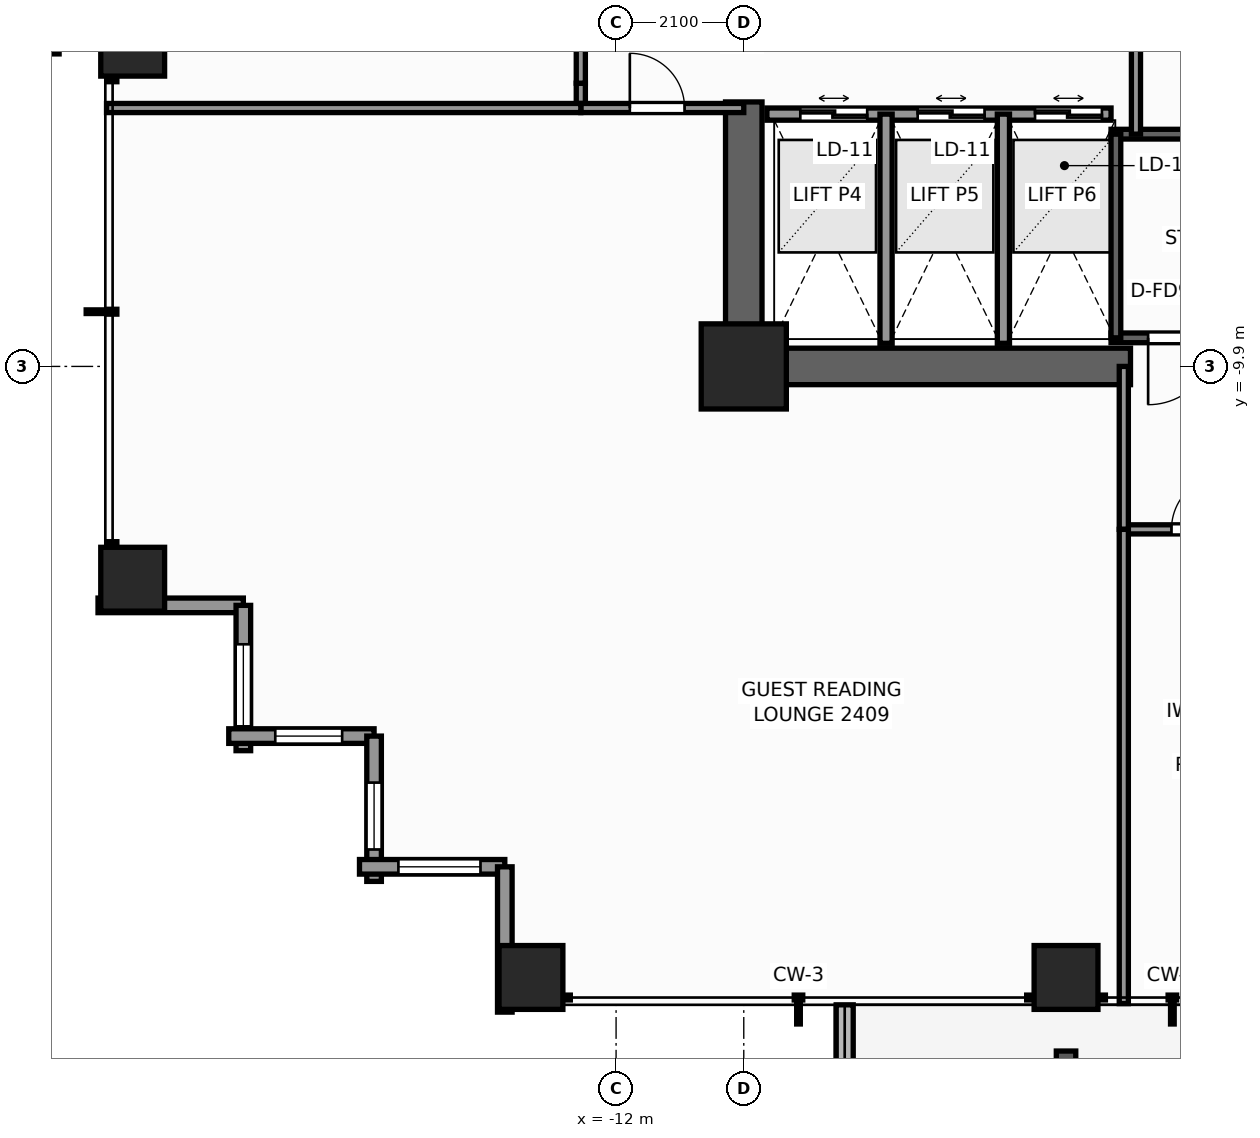
"""IFC4 building model, lengths in metres.
Left out: names, types, materials, properties, quantities, classifications, styles, units other than length and angle.
Written with IfcOpenShell. Run it as: python <this file> out.ifc"""

import sys

from ifc_helpers import new_model, si_unit, direction, frame, frame_2d, origin, origin_2d, place, context, subcontext, project, spatial, rectangle, extrude, element, fill, save


model = new_model("IFC4")
c1 = context("Model", 3, precision=1e-05, world=origin(), true_north=direction((0.0, 1.0)))
c2 = subcontext(c1, "Body", "Model", "MODEL_VIEW")
j1 = project(units=[si_unit("LENGTHUNIT", "METRE"), si_unit("PLANEANGLEUNIT", "RADIAN")], contexts=[c1])
p1 = place(None, origin())
s1 = spatial("IfcSite", under=j1, at=p1, CompositionType="ELEMENT")
p2 = place(p1, origin())
s2 = spatial("IfcBuilding", under=s1, at=p2, CompositionType="ELEMENT")
p3 = place(p2, frame((0.0, 0.0, 85.4)))
s3 = spatial("IfcBuildingStorey", under=s2, at=p3, CompositionType="ELEMENT", Elevation=85.4)
p4 = place(p3, frame((-3.54, -9.9, 0.0), z_axis=(0.0, 0.0, 1.0), x_axis=(-1.0, 0.0, 0.0)))
e1 = element("IfcWall", 1, at=p4, inside=s3, PredefinedType="SHEAR", context=c2, shape_type="SweptSolid", body=[
    extrude(rectangle(XDim=6.66, YDim=0.6, at=frame_2d((3.33, 0.0))), origin(), (0.0, 0.0, 1.0), 3.3),
])
p5 = place(p3, frame((-9.9, -9.6, 0.0), z_axis=(0.0, 0.0, 1.0), x_axis=(0.0, 1.0, 0.0)))
e2 = element("IfcWall", 2, at=p5, inside=s3, PredefinedType="SHEAR", context=c2, shape_type="SweptSolid", body=[
    extrude(rectangle(XDim=4.05, YDim=0.6, at=frame_2d((2.025, 0.0))), origin(), (0.0, 0.0, 1.0), 3.3),
])
p6 = place(p3, frame((-9.9, -9.9, 0.0), z_axis=(0.0, 0.0, 1.0), x_axis=(1.0, 0.0, 0.0)))
e3 = element("IfcColumn", 3, at=p6, inside=s3, PredefinedType="COLUMN", context=c2, shape_type="SweptSolid", body=[
    extrude(rectangle(XDim=1.4, YDim=1.4, at=origin_2d()), origin(), (0.0, 0.0, 1.0), 3.3),
])
for number, where, z_axis, x_axis in (
    (4, (-13.4, -19.95, 0.0), (0.0, 0.0, 1.0), (1.0, 0.0, 0.0)),
    (5, (-4.6, -19.95, 0.0), (0.0, 0.0, 1.0), (1.0, 0.0, 0.0)),
    (6, (-19.95, -13.4, 0.0), (0.0, 0.0, 1.0), (1.0, 0.0, 0.0)),
    (7, (-19.95, -4.6, 0.0), (0.0, 0.0, 1.0), (1.0, 0.0, 0.0)),
):
    element("IfcColumn", number, at=place(p3, frame(where, z_axis=z_axis, x_axis=x_axis)), inside=s3, PredefinedType="COLUMN", context=c2, shape_type="SweptSolid", body=[
        extrude(rectangle(XDim=1.05, YDim=1.05, at=origin_2d()), origin(), (0.0, 0.0, 1.0), 3.3),
    ])
p7 = place(p3, frame((-8.24, -20.4, -0.04), z_axis=(0.0, 0.0, 1.0), x_axis=(0.0, -1.0, 0.0)))
e8 = element("IfcWall", 8, at=p7, inside=s3, PredefinedType="PARAPET", context=c2, shape_type="SweptSolid", body=[
    extrude(rectangle(XDim=2.674, YDim=0.28, at=frame_2d((1.337, 0.0))), origin(), (0.0, 0.0, 1.0), 0.42),
])
p8 = place(p3, frame((-18.13, -13.83, 0.0), z_axis=(0.0, 0.0, 1.0), x_axis=(-1.0, 0.0, 0.0)))
e9 = element("IfcWall", 9, at=p8, inside=s3, PredefinedType="STANDARD", context=c2, shape_type="SweptSolid", body=[
    extrude(rectangle(XDim=2.39, YDim=0.24, at=frame_2d((1.195, 0.0))), origin(), (0.0, 0.0, 1.0), 1.275),
])
p9 = place(p3, frame((-18.13, -16.22, 0.0), z_axis=(0.0, 0.0, 1.0), x_axis=(0.0, 1.0, 0.0)))
e10 = element("IfcWall", 10, at=p9, inside=s3, PredefinedType="STANDARD", context=c2, shape_type="SweptSolid", body=[
    extrude(rectangle(XDim=2.39, YDim=0.24, at=frame_2d((1.195, 0.0))), origin(), (0.0, 0.0, 1.0), 2.459),
])
p10 = place(p9, frame((0.4, 0.0, 0.65)))
e11 = element("IfcOpeningElement", 11, at=p10, cuts=e10, PredefinedType="OPENING", context=c2, shape_type="SweptSolid", body=[
    extrude(rectangle(XDim=1.35, YDim=1.55, at=frame_2d((0.675, 0.775))), frame((0.0, 0.13, 0.0), z_axis=(0.0, -1.0, 0.0), x_axis=(1.0, 0.0, 0.0)), (0.0, 0.0, 1.0), 0.26),
])
p11 = place(p3, frame((-15.98, -15.98, 0.0), z_axis=(0.0, 0.0, 1.0), x_axis=(-1.0, 0.0, 0.0)))
e12 = element("IfcWall", 12, at=p11, inside=s3, PredefinedType="STANDARD", context=c2, shape_type="SweptSolid", body=[
    extrude(rectangle(XDim=2.39, YDim=0.24, at=frame_2d((1.195, 0.0))), origin(), (0.0, 0.0, 1.0), 2.459),
])
p12 = place(p11, frame((0.525, 0.0, 0.65)))
e13 = element("IfcOpeningElement", 13, at=p12, cuts=e12, PredefinedType="OPENING", context=c2, shape_type="SweptSolid", body=[
    extrude(rectangle(XDim=1.1, YDim=1.45, at=frame_2d((0.55, 0.725))), frame((0.0, 0.13, 0.0), z_axis=(0.0, -1.0, 0.0), x_axis=(1.0, 0.0, 0.0)), (0.0, 0.0, 1.0), 0.26),
])
p13 = place(p3, frame((-15.98, -18.37, 0.0), z_axis=(0.0, 0.0, 1.0), x_axis=(0.0, 1.0, 0.0)))
e14 = element("IfcWall", 14, at=p13, inside=s3, PredefinedType="STANDARD", context=c2, shape_type="SweptSolid", body=[
    extrude(rectangle(XDim=2.39, YDim=0.24, at=frame_2d((1.195, 0.0))), origin(), (0.0, 0.0, 1.0), 2.459),
])
p14 = place(p13, frame((0.525, 0.0, 0.65)))
e15 = element("IfcOpeningElement", 15, at=p14, cuts=e14, PredefinedType="OPENING", context=c2, shape_type="SweptSolid", body=[
    extrude(rectangle(XDim=1.1, YDim=1.45, at=frame_2d((0.55, 0.725))), frame((0.0, 0.13, 0.0), z_axis=(0.0, -1.0, 0.0), x_axis=(1.0, 0.0, 0.0)), (0.0, 0.0, 1.0), 0.26),
])
p15 = place(p3, frame((-13.83, -18.13, 0.0), z_axis=(0.0, 0.0, 1.0), x_axis=(-1.0, 0.0, 0.0)))
e16 = element("IfcWall", 16, at=p15, inside=s3, PredefinedType="STANDARD", context=c2, shape_type="SweptSolid", body=[
    extrude(rectangle(XDim=2.39, YDim=0.24, at=frame_2d((1.195, 0.0))), origin(), (0.0, 0.0, 1.0), 2.459),
])
p16 = place(p15, frame((0.4, 0.0, 0.65)))
e17 = element("IfcOpeningElement", 17, at=p16, cuts=e16, PredefinedType="OPENING", context=c2, shape_type="SweptSolid", body=[
    extrude(rectangle(XDim=1.35, YDim=1.55, at=frame_2d((0.675, 0.775))), frame((0.0, 0.13, 0.0), z_axis=(0.0, -1.0, 0.0), x_axis=(1.0, 0.0, 0.0)), (0.0, 0.0, 1.0), 0.26),
])
p17 = place(p3, frame((-13.83, -20.52, 0.0), z_axis=(0.0, 0.0, 1.0), x_axis=(0.0, 1.0, 0.0)))
e18 = element("IfcWall", 18, at=p17, inside=s3, PredefinedType="STANDARD", context=c2, shape_type="SweptSolid", body=[
    extrude(rectangle(XDim=2.39, YDim=0.24, at=frame_2d((1.195, 0.0))), origin(), (0.0, 0.0, 1.0), 1.275),
])
p18 = place(p3, frame((3.86, -9.43, 0.0), z_axis=(0.0, 0.0, 1.0), x_axis=(-1.0, 0.0, 0.0)))
e19 = element("IfcWall", 19, at=p18, inside=s3, PredefinedType="SHEAR", context=c2, shape_type="SweptSolid", body=[
    extrude(rectangle(XDim=7.72, YDim=0.16, at=frame_2d((3.86, 0.0))), origin(), (0.0, 0.0, 1.0), 3.3),
])
p19 = place(p18, frame((6.01, 0.0, 0.0)))
e20 = element("IfcOpeningElement", 20, at=p19, cuts=e19, PredefinedType="OPENING", context=c2, shape_type="SweptSolid", body=[
    extrude(rectangle(XDim=1.1, YDim=2.2, at=frame_2d((0.55, 1.1))), frame((0.0, 0.09, 0.0), z_axis=(0.0, -1.0, 0.0), x_axis=(1.0, 0.0, 0.0)), (0.0, 0.0, 1.0), 0.18),
])
p20 = place(p3, frame((-3.86, -6.08, 0.0), z_axis=(0.0, 0.0, 1.0), x_axis=(1.0, 0.0, 0.0)))
e21 = element("IfcWall", 21, at=p20, inside=s3, PredefinedType="SHEAR", context=c2, shape_type="SweptSolid", body=[
    extrude(rectangle(XDim=7.72, YDim=0.16, at=frame_2d((3.86, 0.0))), origin(), (0.0, 0.0, 1.0), 3.3),
])
p21 = place(p3, frame((-3.78, -9.43, 0.0), z_axis=(0.0, 0.0, 1.0), x_axis=(0.0, 1.0, 0.0)))
e22 = element("IfcWall", 22, at=p21, inside=s3, PredefinedType="SHEAR", context=c2, shape_type="SweptSolid", body=[
    extrude(rectangle(XDim=3.35, YDim=0.16, at=frame_2d((1.675, 0.0))), origin(), (0.0, 0.0, 1.0), 3.3),
])
p22 = place(p3, frame((-9.52, -5.75, 0.0), z_axis=(0.0, 0.0, 1.0), x_axis=(1.0, 0.0, 0.0)))
e23 = element("IfcWall", 23, at=p22, inside=s3, PredefinedType="SOLIDWALL", context=c2, shape_type="SweptSolid", body=[
    extrude(rectangle(XDim=5.66, YDim=0.2, at=frame_2d((2.83, 0.0))), origin(), (0.0, 0.0, 1.0), 3.08),
])
p23 = place(p22, frame((0.55, 0.0, 0.0)))
e24 = element("IfcOpeningElement", 24, at=p23, cuts=e23, PredefinedType="OPENING", context=c2, shape_type="SweptSolid", body=[
    extrude(rectangle(XDim=1.1, YDim=2.2, at=frame_2d((0.55, 1.1))), frame((0.0, 0.11, 0.0), z_axis=(0.0, -1.0, 0.0), x_axis=(1.0, 0.0, 0.0)), (0.0, 0.0, 1.0), 0.22),
])
p24 = place(p22, frame((2.48, 0.0, 0.0)))
e25 = element("IfcOpeningElement", 25, at=p24, cuts=e23, PredefinedType="OPENING", context=c2, shape_type="SweptSolid", body=[
    extrude(rectangle(XDim=1.1, YDim=2.2, at=frame_2d((0.55, 1.1))), frame((0.0, 0.11, 0.0), z_axis=(0.0, -1.0, 0.0), x_axis=(1.0, 0.0, 0.0)), (0.0, 0.0, 1.0), 0.22),
])
p25 = place(p22, frame((4.41, 0.0, 0.0)))
e26 = element("IfcOpeningElement", 26, at=p25, cuts=e23, PredefinedType="OPENING", context=c2, shape_type="SweptSolid", body=[
    extrude(rectangle(XDim=1.1, YDim=2.2, at=frame_2d((0.55, 1.1))), frame((0.0, 0.11, 0.0), z_axis=(0.0, -1.0, 0.0), x_axis=(1.0, 0.0, 0.0)), (0.0, 0.0, 1.0), 0.22),
])
for number, where, z_axis, x_axis in (
    (27, (-7.56, -9.52, 0.0), (0.0, 0.0, 1.0), (0.0, 1.0, 0.0)),
    (28, (-5.63, -9.52, 0.0), (0.0, 0.0, 1.0), (0.0, 1.0, 0.0)),
):
    element("IfcWall", number, at=place(p3, frame(where, z_axis=z_axis, x_axis=x_axis)), inside=s3, PredefinedType="SOLIDWALL", context=c2, shape_type="SweptSolid", body=[
        extrude(rectangle(XDim=3.77, YDim=0.2, at=frame_2d((1.885, 0.0))), origin(), (0.0, 0.0, 1.0), 3.08),
    ])
p26 = place(p3, frame((-3.45, -6.08, 0.0), z_axis=(0.0, 0.0, 1.0), x_axis=(0.0, 1.0, 0.0)))
e29 = element("IfcWall", 29, at=p26, inside=s3, PredefinedType="PARTITIONING", context=c2, shape_type="SweptSolid", body=[
    extrude(rectangle(XDim=2.36, YDim=0.15, at=frame_2d((1.18, 0.0))), origin(), (0.0, 0.0, 1.0), 3.08),
])
p27 = place(p3, frame((-3.65, -12.58, 0.0), z_axis=(0.0, 0.0, 1.0), x_axis=(1.0, 0.0, 0.0)))
e30 = element("IfcWall", 30, at=p27, inside=s3, PredefinedType="PARTITIONING", context=c2, shape_type="SweptSolid", body=[
    extrude(rectangle(XDim=7.608, YDim=0.15, at=frame_2d((3.804, 0.0))), origin(), (0.0, 0.0, 1.0), 2.605),
])
p28 = place(p27, frame((0.784, 0.0, 0.0)))
e31 = element("IfcOpeningElement", 31, at=p28, cuts=e30, PredefinedType="OPENING", context=c2, shape_type="SweptSolid", body=[
    extrude(rectangle(XDim=0.9, YDim=2.06, at=frame_2d((0.45, 1.03))), frame((0.0, 0.085, 0.0), z_axis=(0.0, -1.0, 0.0), x_axis=(1.0, 0.0, 0.0)), (0.0, 0.0, 1.0), 0.17),
])
p29 = place(p27, frame((4.418, 0.0, 0.0)))
e32 = element("IfcOpeningElement", 32, at=p29, cuts=e30, PredefinedType="OPENING", context=c2, shape_type="SweptSolid", body=[
    extrude(rectangle(XDim=0.95, YDim=2.06, at=frame_2d((0.475, 1.03))), frame((0.0, 0.085, 0.0), z_axis=(0.0, -1.0, 0.0), x_axis=(1.0, 0.0, 0.0)), (0.0, 0.0, 1.0), 0.17),
])
p30 = place(p3, frame((-3.65, -12.58, 0.0), z_axis=(0.0, 0.0, 1.0), x_axis=(0.0, 1.0, 0.0)))
e33 = element("IfcWall", 33, at=p30, inside=s3, PredefinedType="PARTITIONING", context=c2, shape_type="SweptSolid", body=[
    extrude(rectangle(XDim=2.68, YDim=0.15, at=frame_2d((1.34, 0.0))), origin(), (0.0, 0.0, 1.0), 3.08),
])
p31 = place(p3, frame((-12.58, -5.65, 0.0), z_axis=(0.0, 0.0, 1.0), x_axis=(0.0, 1.0, 0.0)))
e34 = element("IfcWall", 34, at=p31, inside=s3, PredefinedType="PARTITIONING", context=c2, shape_type="SweptSolid", body=[
    extrude(rectangle(XDim=0.408, YDim=0.15, at=frame_2d((0.204, 0.0))), origin(), (0.0, 0.0, 1.0), 3.08),
])
p32 = place(p3, frame((-12.58, -5.242, 0.0), z_axis=(0.0, 0.0, 1.0), x_axis=(0.0, 1.0, 0.0)))
e35 = element("IfcWall", 35, at=p32, inside=s3, PredefinedType="PARTITIONING", context=c2, shape_type="SweptSolid", body=[
    extrude(rectangle(XDim=1.284, YDim=0.15, at=frame_2d((0.642, 0.0))), origin(), (0.0, 0.0, 1.0), 1.265),
])
p33 = place(p3, frame((-12.58, -5.65, 0.0), z_axis=(0.0, 0.0, 1.0), x_axis=(1.0, 0.0, 0.0)))
e36 = element("IfcWall", 36, at=p33, inside=s3, PredefinedType="PARTITIONING", context=c2, shape_type="SweptSolid", body=[
    extrude(rectangle(XDim=2.68, YDim=0.15, at=frame_2d((1.34, 0.0))), origin(), (0.0, 0.0, 1.0), 3.08),
])
p34 = place(p33, frame((0.806, 0.0, 0.0)))
e37 = element("IfcOpeningElement", 37, at=p34, cuts=e36, PredefinedType="OPENING", context=c2, shape_type="SweptSolid", body=[
    extrude(rectangle(XDim=0.9, YDim=2.06, at=frame_2d((0.45, 1.03))), frame((0.0, 0.085, 0.0), z_axis=(0.0, -1.0, 0.0), x_axis=(1.0, 0.0, 0.0)), (0.0, 0.0, 1.0), 0.17),
])
for number, where, z_axis, x_axis in (
    (38, (-20.38, -5.65, 0.0), (0.0, 0.0, 1.0), (1.0, 0.0, 0.0)),
    (39, (-3.65, -20.38, 0.0), (0.0, 0.0, 1.0), (0.0, 1.0, 0.0)),
):
    element("IfcWall", number, at=place(p3, frame(where, z_axis=z_axis, x_axis=x_axis)), inside=s3, PredefinedType="PARTITIONING", context=c2, shape_type="SweptSolid", body=[
        extrude(rectangle(XDim=7.8, YDim=0.15, at=frame_2d((3.9, 0.0))), origin(), (0.0, 0.0, 1.0), 2.449),
    ])
p35 = place(p10, origin())
e40 = element("IfcWindow", 40, at=p35, inside=s3, PartitioningType="SINGLE_PANEL", PredefinedType="WINDOW", context=c2, shape_type="SweptSolid", body=[
    extrude(rectangle(XDim=1.35, YDim=1.55, at=frame_2d((0.675, 0.775))), frame((0.0, 0.03, 0.0), z_axis=(0.0, -1.0, 0.0), x_axis=(1.0, 0.0, 0.0)), (0.0, 0.0, 1.0), 0.06),
])
fill(e11, e40)
p36 = place(p12, origin())
e41 = element("IfcWindow", 41, at=p36, inside=s3, PartitioningType="SINGLE_PANEL", PredefinedType="WINDOW", context=c2, shape_type="SweptSolid", body=[
    extrude(rectangle(XDim=1.1, YDim=1.45, at=frame_2d((0.55, 0.725))), frame((0.0, 0.03, 0.0), z_axis=(0.0, -1.0, 0.0), x_axis=(1.0, 0.0, 0.0)), (0.0, 0.0, 1.0), 0.06),
])
fill(e13, e41)
p37 = place(p14, origin())
e42 = element("IfcWindow", 42, at=p37, inside=s3, PartitioningType="SINGLE_PANEL", PredefinedType="WINDOW", context=c2, shape_type="SweptSolid", body=[
    extrude(rectangle(XDim=1.1, YDim=1.45, at=frame_2d((0.55, 0.725))), frame((0.0, 0.03, 0.0), z_axis=(0.0, -1.0, 0.0), x_axis=(1.0, 0.0, 0.0)), (0.0, 0.0, 1.0), 0.06),
])
fill(e15, e42)
p38 = place(p16, origin())
e43 = element("IfcWindow", 43, at=p38, inside=s3, PartitioningType="SINGLE_PANEL", PredefinedType="WINDOW", context=c2, shape_type="SweptSolid", body=[
    extrude(rectangle(XDim=1.35, YDim=1.55, at=frame_2d((0.675, 0.775))), frame((0.0, 0.03, 0.0), z_axis=(0.0, -1.0, 0.0), x_axis=(1.0, 0.0, 0.0)), (0.0, 0.0, 1.0), 0.06),
])
fill(e17, e43)
p39 = place(p19, origin())
e44 = element("IfcDoor", 44, at=p39, inside=s3, OperationType="SINGLE_SWING_RIGHT", PredefinedType="DOOR", context=c2, shape_type="SweptSolid", body=[
    extrude(rectangle(XDim=1.1, YDim=2.2, at=frame_2d((0.55, 1.1))), frame((0.0, 0.025, 0.0), z_axis=(0.0, -1.0, 0.0), x_axis=(1.0, 0.0, 0.0)), (0.0, 0.0, 1.0), 0.05),
])
fill(e20, e44)
p40 = place(p23, origin())
e45 = element("IfcDoor", 45, at=p40, inside=s3, OperationType="DOUBLE_DOOR_SLIDING", PredefinedType="DOOR", context=c2, shape_type="SweptSolid", body=[
    extrude(rectangle(XDim=1.1, YDim=2.2, at=frame_2d((0.55, 1.1))), frame((0.0, 0.025, 0.0), z_axis=(0.0, -1.0, 0.0), x_axis=(1.0, 0.0, 0.0)), (0.0, 0.0, 1.0), 0.05),
])
fill(e24, e45)
p41 = place(p24, origin())
e46 = element("IfcDoor", 46, at=p41, inside=s3, OperationType="DOUBLE_DOOR_SLIDING", PredefinedType="DOOR", context=c2, shape_type="SweptSolid", body=[
    extrude(rectangle(XDim=1.1, YDim=2.2, at=frame_2d((0.55, 1.1))), frame((0.0, 0.025, 0.0), z_axis=(0.0, -1.0, 0.0), x_axis=(1.0, 0.0, 0.0)), (0.0, 0.0, 1.0), 0.05),
])
fill(e25, e46)
p42 = place(p25, origin())
e47 = element("IfcDoor", 47, at=p42, inside=s3, OperationType="DOUBLE_DOOR_SLIDING", PredefinedType="DOOR", context=c2, shape_type="SweptSolid", body=[
    extrude(rectangle(XDim=1.1, YDim=2.2, at=frame_2d((0.55, 1.1))), frame((0.0, 0.025, 0.0), z_axis=(0.0, -1.0, 0.0), x_axis=(1.0, 0.0, 0.0)), (0.0, 0.0, 1.0), 0.05),
])
fill(e26, e47)
p43 = place(p34, origin())
e48 = element("IfcDoor", 48, at=p43, inside=s3, OperationType="SINGLE_SWING_LEFT", PredefinedType="DOOR", context=c2, shape_type="SweptSolid", body=[
    extrude(rectangle(XDim=0.9, YDim=2.06, at=frame_2d((0.45, 1.03))), frame((0.0, 0.025, 0.0), z_axis=(0.0, -1.0, 0.0), x_axis=(1.0, 0.0, 0.0)), (0.0, 0.0, 1.0), 0.05),
])
fill(e37, e48)
p44 = place(p28, origin())
e49 = element("IfcDoor", 49, at=p44, inside=s3, OperationType="SINGLE_SWING_RIGHT", PredefinedType="DOOR", context=c2, shape_type="SweptSolid", body=[
    extrude(rectangle(XDim=0.9, YDim=2.06, at=frame_2d((0.45, 1.03))), frame((0.0, 0.025, 0.0), z_axis=(0.0, -1.0, 0.0), x_axis=(1.0, 0.0, 0.0)), (0.0, 0.0, 1.0), 0.05),
])
fill(e31, e49)
save(model, sys.argv[1])
